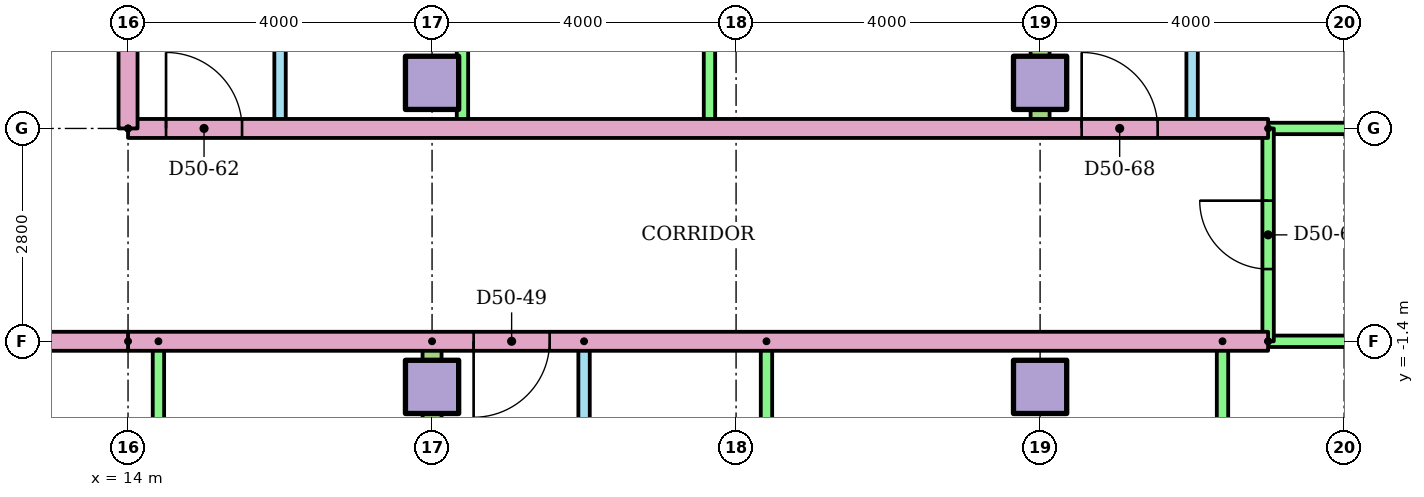
"""IFC4 building model, lengths in metres.
Left out: names, types, materials, properties, quantities, classifications, styles, units other than length and angle.
Written with IfcOpenShell. Run it as: python <this file> out.ifc"""

import sys

from ifc_helpers import new_model, si_unit, direction, frame, frame_2d, origin, origin_2d, place, context, subcontext, project, spatial, rectangle, extrude, element, fill, save


model = new_model("IFC4")
c1 = context("Model", 3, precision=1e-05, world=origin(), true_north=direction((0.0, 1.0)))
c2 = subcontext(c1, "Body", "Model", "MODEL_VIEW")
j1 = project(units=[si_unit("LENGTHUNIT", "METRE"), si_unit("PLANEANGLEUNIT", "RADIAN")], contexts=[c1])
p1 = place(None, origin())
s1 = spatial("IfcSite", under=j1, at=p1, CompositionType="ELEMENT")
p2 = place(p1, origin())
s2 = spatial("IfcBuilding", under=s1, at=p2, CompositionType="ELEMENT")
p3 = place(p2, frame((0.0, 0.0, 190.9)))
s3 = spatial("IfcBuildingStorey", under=s2, at=p3, CompositionType="ELEMENT", Elevation=190.9)
for number, where in (
    (1, (18.0, -2.0, 0.0)),
    (2, (26.0, -2.0, 0.0)),
    (3, (18.0, 2.0, 0.0)),
    (4, (26.0, 2.0, 0.0)),
):
    element("IfcColumn", number, at=place(p3, frame(where)), inside=s3, PredefinedType="COLUMN", context=c2, shape_type="SweptSolid", body=[
        extrude(rectangle(XDim=0.7, YDim=0.7, at=origin_2d()), origin(), (0.0, 0.0, 1.0), 3.2),
    ])
p4 = place(p3, frame((14.4, -1.4, 0.0), z_axis=(0.0, 0.0, 1.0), x_axis=(0.0, -1.0, 0.0)))
e5 = element("IfcWall", 5, at=p4, inside=s3, PredefinedType="PARTITIONING", context=c2, shape_type="SweptSolid", body=[
    extrude(rectangle(XDim=5.5, YDim=0.15, at=frame_2d((2.75, 0.0))), origin(), (0.0, 0.0, 1.0), 2.4),
])
p5 = place(p3, frame((20.0, -1.4, 0.0), z_axis=(0.0, 0.0, 1.0), x_axis=(0.0, -1.0, 0.0)))
e6 = element("IfcWall", 6, at=p5, inside=s3, PredefinedType="PARTITIONING", context=c2, shape_type="SweptSolid", body=[
    extrude(rectangle(XDim=5.5, YDim=0.15, at=frame_2d((2.75, 0.0))), origin(), (0.0, 0.0, 1.0), 2.4),
])
p6 = place(p5, frame((1.05, 0.0, 0.0)))
e7 = element("IfcOpeningElement", 7, at=p6, cuts=e6, PredefinedType="OPENING", context=c2, shape_type="SweptSolid", body=[
    extrude(rectangle(XDim=0.9, YDim=2.1, at=frame_2d((0.45, 1.05))), frame((0.0, 0.085, 0.0), z_axis=(0.0, -1.0, 0.0), x_axis=(1.0, 0.0, 0.0)), (0.0, 0.0, 1.0), 0.17),
])
p7 = place(p5, frame((3.85, 0.0, 0.0)))
e8 = element("IfcOpeningElement", 8, at=p7, cuts=e6, PredefinedType="OPENING", context=c2, shape_type="SweptSolid", body=[
    extrude(rectangle(XDim=0.8, YDim=2.1, at=frame_2d((0.4, 1.05))), frame((0.0, 0.085, 0.0), z_axis=(0.0, -1.0, 0.0), x_axis=(1.0, 0.0, 0.0)), (0.0, 0.0, 1.0), 0.17),
])
for number, where, z_axis, x_axis in (
    (9, (22.4, -1.4, 0.0), (0.0, 0.0, 1.0), (0.0, -1.0, 0.0)),
    (10, (28.4, -1.4, 0.0), (0.0, 0.0, 1.0), (0.0, -1.0, 0.0)),
):
    element("IfcWall", number, at=place(p3, frame(where, z_axis=z_axis, x_axis=x_axis)), inside=s3, PredefinedType="PARTITIONING", context=c2, shape_type="SweptSolid", body=[
        extrude(rectangle(XDim=5.5, YDim=0.15, at=frame_2d((2.75, 0.0))), origin(), (0.0, 0.0, 1.0), 2.4),
    ])
p8 = place(p3, frame((18.0, -1.4, 0.0), z_axis=(0.0, 0.0, 1.0), x_axis=(0.0, -1.0, 0.0)))
e11 = element("IfcWall", 11, at=p8, inside=s3, PredefinedType="PARTITIONING", context=c2, shape_type="SweptSolid", body=[
    extrude(rectangle(XDim=15.01, YDim=0.25, at=frame_2d((7.505, 0.0))), origin(), (0.0, 0.0, 1.0), 2.4),
])
p9 = place(p3, frame((29.0, -1.4, 0.0), z_axis=(0.0, 0.0, 1.0), x_axis=(-1.0, 0.0, 0.0)))
e12 = element("IfcWall", 12, at=p9, inside=s3, PredefinedType="PARTITIONING", context=c2, shape_type="SweptSolid", body=[
    extrude(rectangle(XDim=15.0, YDim=0.25, at=frame_2d((7.5, 0.0))), origin(), (0.0, 0.0, 1.0), 2.4),
])
p10 = place(p9, frame((9.453, 0.0, 0.0)))
e13 = element("IfcOpeningElement", 13, at=p10, cuts=e12, PredefinedType="OPENING", context=c2, shape_type="SweptSolid", body=[
    extrude(rectangle(XDim=1.0, YDim=2.1, at=frame_2d((0.5, 1.05))), frame((0.0, 0.135, 0.0), z_axis=(0.0, -1.0, 0.0), x_axis=(1.0, 0.0, 0.0)), (0.0, 0.0, 1.0), 0.27),
])
p11 = place(p3, frame((36.82, -1.4, 0.0), z_axis=(0.0, 0.0, 1.0), x_axis=(-1.0, 0.0, 0.0)))
e14 = element("IfcWall", 14, at=p11, inside=s3, PredefinedType="PARTITIONING", context=c2, shape_type="SweptSolid", body=[
    extrude(rectangle(XDim=7.82, YDim=0.15, at=frame_2d((3.91, 0.0))), origin(), (0.0, 0.0, 1.0), 2.4),
])
p12 = place(p3, frame((16.0, 9.3, 0.0), z_axis=(0.0, 0.0, 1.0), x_axis=(0.0, -1.0, 0.0)))
e15 = element("IfcWall", 15, at=p12, inside=s3, PredefinedType="PARTITIONING", context=c2, shape_type="SweptSolid", body=[
    extrude(rectangle(XDim=7.9, YDim=0.15, at=frame_2d((3.95, 0.0))), origin(), (0.0, 0.0, 1.0), 2.4),
])
p13 = place(p12, frame((5.325, 0.0, 0.0)))
e16 = element("IfcOpeningElement", 16, at=p13, cuts=e15, PredefinedType="OPENING", context=c2, shape_type="SweptSolid", body=[
    extrude(rectangle(XDim=0.9, YDim=2.1, at=frame_2d((0.45, 1.05))), frame((0.0, 0.085, 0.0), z_axis=(0.0, -1.0, 0.0), x_axis=(1.0, 0.0, 0.0)), (0.0, 0.0, 1.0), 0.17),
])
p14 = place(p12, frame((1.425, 0.0, 0.0)))
e17 = element("IfcOpeningElement", 17, at=p14, cuts=e15, PredefinedType="OPENING", context=c2, shape_type="SweptSolid", body=[
    extrude(rectangle(XDim=0.8, YDim=2.1, at=frame_2d((0.4, 1.05))), frame((0.0, 0.085, 0.0), z_axis=(0.0, -1.0, 0.0), x_axis=(1.0, 0.0, 0.0)), (0.0, 0.0, 1.0), 0.17),
])
for number, where, z_axis, x_axis in (
    (18, (18.4, 9.3, 0.0), (0.0, 0.0, 1.0), (0.0, -1.0, 0.0)),
    (19, (21.65, 9.3, 0.0), (0.0, 0.0, 1.0), (0.0, -1.0, 0.0)),
):
    element("IfcWall", number, at=place(p3, frame(where, z_axis=z_axis, x_axis=x_axis)), inside=s3, PredefinedType="PARTITIONING", context=c2, shape_type="SweptSolid", body=[
        extrude(rectangle(XDim=7.9, YDim=0.15, at=frame_2d((3.95, 0.0))), origin(), (0.0, 0.0, 1.0), 2.4),
    ])
p15 = place(p3, frame((28.0, 9.3, 0.0), z_axis=(0.0, 0.0, 1.0), x_axis=(0.0, -1.0, 0.0)))
e20 = element("IfcWall", 20, at=p15, inside=s3, PredefinedType="PARTITIONING", context=c2, shape_type="SweptSolid", body=[
    extrude(rectangle(XDim=7.9, YDim=0.15, at=frame_2d((3.95, 0.0))), origin(), (0.0, 0.0, 1.0), 2.4),
])
p16 = place(p15, frame((5.325, 0.0, 0.0)))
e21 = element("IfcOpeningElement", 21, at=p16, cuts=e20, PredefinedType="OPENING", context=c2, shape_type="SweptSolid", body=[
    extrude(rectangle(XDim=0.9, YDim=2.1, at=frame_2d((0.45, 1.05))), frame((0.0, 0.085, 0.0), z_axis=(0.0, -1.0, 0.0), x_axis=(1.0, 0.0, 0.0)), (0.0, 0.0, 1.0), 0.17),
])
p17 = place(p15, frame((1.425, 0.0, 0.0)))
e22 = element("IfcOpeningElement", 22, at=p17, cuts=e20, PredefinedType="OPENING", context=c2, shape_type="SweptSolid", body=[
    extrude(rectangle(XDim=0.8, YDim=2.1, at=frame_2d((0.4, 1.05))), frame((0.0, 0.085, 0.0), z_axis=(0.0, -1.0, 0.0), x_axis=(1.0, 0.0, 0.0)), (0.0, 0.0, 1.0), 0.17),
])
p18 = place(p3, frame((26.0, 18.821, 0.0), z_axis=(0.0, 0.0, 1.0), x_axis=(0.0, -1.0, 0.0)))
e23 = element("IfcWall", 23, at=p18, inside=s3, PredefinedType="PARTITIONING", context=c2, shape_type="SweptSolid", body=[
    extrude(rectangle(XDim=17.421, YDim=0.25, at=frame_2d((8.71, 0.0))), origin(), (0.0, 0.0, 1.0), 2.4),
])
p19 = place(p3, frame((14.0, 1.4, 0.0)))
e24 = element("IfcWall", 24, at=p19, inside=s3, PredefinedType="PARTITIONING", context=c2, shape_type="SweptSolid", body=[
    extrude(rectangle(XDim=15.0, YDim=0.25, at=frame_2d((7.5, 0.0))), origin(), (0.0, 0.0, 1.0), 2.4),
])
p20 = place(p19, frame((0.5, 0.0, 0.0)))
e25 = element("IfcOpeningElement", 25, at=p20, cuts=e24, PredefinedType="OPENING", context=c2, shape_type="SweptSolid", body=[
    extrude(rectangle(XDim=1.0, YDim=2.1, at=frame_2d((0.5, 1.05))), frame((0.0, 0.135, 0.0), z_axis=(0.0, -1.0, 0.0), x_axis=(1.0, 0.0, 0.0)), (0.0, 0.0, 1.0), 0.27),
])
p21 = place(p19, frame((12.547, 0.0, 0.0)))
e26 = element("IfcOpeningElement", 26, at=p21, cuts=e24, PredefinedType="OPENING", context=c2, shape_type="SweptSolid", body=[
    extrude(rectangle(XDim=1.0, YDim=2.1, at=frame_2d((0.5, 1.05))), frame((0.0, 0.135, 0.0), z_axis=(0.0, -1.0, 0.0), x_axis=(1.0, 0.0, 0.0)), (0.0, 0.0, 1.0), 0.27),
])
p22 = place(p3, frame((29.0, 1.4, 0.0)))
e27 = element("IfcWall", 27, at=p22, inside=s3, PredefinedType="PARTITIONING", context=c2, shape_type="SweptSolid", body=[
    extrude(rectangle(XDim=7.82, YDim=0.15, at=frame_2d((3.91, 0.0))), origin(), (0.0, 0.0, 1.0), 2.4),
])
p23 = place(p3, frame((29.0, -1.4, 0.0), z_axis=(0.0, 0.0, 1.0), x_axis=(0.0, 1.0, 0.0)))
e28 = element("IfcWall", 28, at=p23, inside=s3, PredefinedType="PARTITIONING", context=c2, shape_type="SweptSolid", body=[
    extrude(rectangle(XDim=2.8, YDim=0.15, at=frame_2d((1.4, 0.0))), origin(), (0.0, 0.0, 1.0), 2.4),
])
p24 = place(p23, frame((0.95, 0.0, 0.0)))
e29 = element("IfcOpeningElement", 29, at=p24, cuts=e28, PredefinedType="OPENING", context=c2, shape_type="SweptSolid", body=[
    extrude(rectangle(XDim=0.9, YDim=2.1, at=frame_2d((0.45, 1.05))), frame((0.0, 0.085, 0.0), z_axis=(0.0, -1.0, 0.0), x_axis=(1.0, 0.0, 0.0)), (0.0, 0.0, 1.0), 0.17),
])
p25 = place(p3, frame((14.0, -1.4, 0.0), z_axis=(0.0, 0.0, 1.0), x_axis=(-1.0, 0.0, 0.0)))
e30 = element("IfcWall", 30, at=p25, inside=s3, PredefinedType="PARTITIONING", context=c2, shape_type="SweptSolid", body=[
    extrude(rectangle(XDim=28.0, YDim=0.25, at=frame_2d((14.0, 0.0))), origin(), (0.0, 0.0, 1.0), 2.4),
])
p26 = place(p25, frame((4.547, 0.0, 0.0)))
e31 = element("IfcOpeningElement", 31, at=p26, cuts=e30, PredefinedType="OPENING", context=c2, shape_type="SweptSolid", body=[
    extrude(rectangle(XDim=1.0, YDim=2.1, at=frame_2d((0.5, 1.05))), frame((0.0, 0.135, 0.0), z_axis=(0.0, -1.0, 0.0), x_axis=(1.0, 0.0, 0.0)), (0.0, 0.0, 1.0), 0.27),
])
p27 = place(p25, frame((2.453, 0.0, 0.0)))
e32 = element("IfcOpeningElement", 32, at=p27, cuts=e30, PredefinedType="OPENING", context=c2, shape_type="SweptSolid", body=[
    extrude(rectangle(XDim=1.0, YDim=2.1, at=frame_2d((0.5, 1.05))), frame((0.0, 0.135, 0.0), z_axis=(0.0, -1.0, 0.0), x_axis=(1.0, 0.0, 0.0)), (0.0, 0.0, 1.0), 0.27),
])
p28 = place(p3, frame((14.0, 1.4, 0.0), z_axis=(0.0, 0.0, 1.0), x_axis=(0.0, 1.0, 0.0)))
e33 = element("IfcWall", 33, at=p28, inside=s3, PredefinedType="PARTITIONING", context=c2, shape_type="SweptSolid", body=[
    extrude(rectangle(XDim=1.6, YDim=0.25, at=frame_2d((0.8, 0.0))), origin(), (0.0, 0.0, 1.0), 2.4),
])
p29 = place(p10, origin())
e34 = element("IfcDoor", 34, at=p29, inside=s3, OperationType="SINGLE_SWING_RIGHT", PredefinedType="DOOR", context=c2, shape_type="SweptSolid", body=[
    extrude(rectangle(XDim=1.0, YDim=2.1, at=frame_2d((0.5, 1.05))), frame((0.0, 0.025, 0.0), z_axis=(0.0, -1.0, 0.0), x_axis=(1.0, 0.0, 0.0)), (0.0, 0.0, 1.0), 0.05),
])
fill(e13, e34)
p30 = place(p20, origin())
e35 = element("IfcDoor", 35, at=p30, inside=s3, OperationType="SINGLE_SWING_LEFT", PredefinedType="DOOR", context=c2, shape_type="SweptSolid", body=[
    extrude(rectangle(XDim=1.0, YDim=2.1, at=frame_2d((0.5, 1.05))), frame((0.0, 0.025, 0.0), z_axis=(0.0, -1.0, 0.0), x_axis=(1.0, 0.0, 0.0)), (0.0, 0.0, 1.0), 0.05),
])
fill(e25, e35)
p31 = place(p21, origin())
e36 = element("IfcDoor", 36, at=p31, inside=s3, OperationType="SINGLE_SWING_LEFT", PredefinedType="DOOR", context=c2, shape_type="SweptSolid", body=[
    extrude(rectangle(XDim=1.0, YDim=2.1, at=frame_2d((0.5, 1.05))), frame((0.0, 0.025, 0.0), z_axis=(0.0, -1.0, 0.0), x_axis=(1.0, 0.0, 0.0)), (0.0, 0.0, 1.0), 0.05),
])
fill(e26, e36)
p32 = place(p24, origin())
e37 = element("IfcDoor", 37, at=p32, inside=s3, OperationType="SINGLE_SWING_RIGHT", PredefinedType="DOOR", context=c2, shape_type="SweptSolid", body=[
    extrude(rectangle(XDim=0.9, YDim=2.1, at=frame_2d((0.45, 1.05))), frame((0.0, 0.025, 0.0), z_axis=(0.0, -1.0, 0.0), x_axis=(1.0, 0.0, 0.0)), (0.0, 0.0, 1.0), 0.05),
])
fill(e29, e37)
save(model, sys.argv[1])
